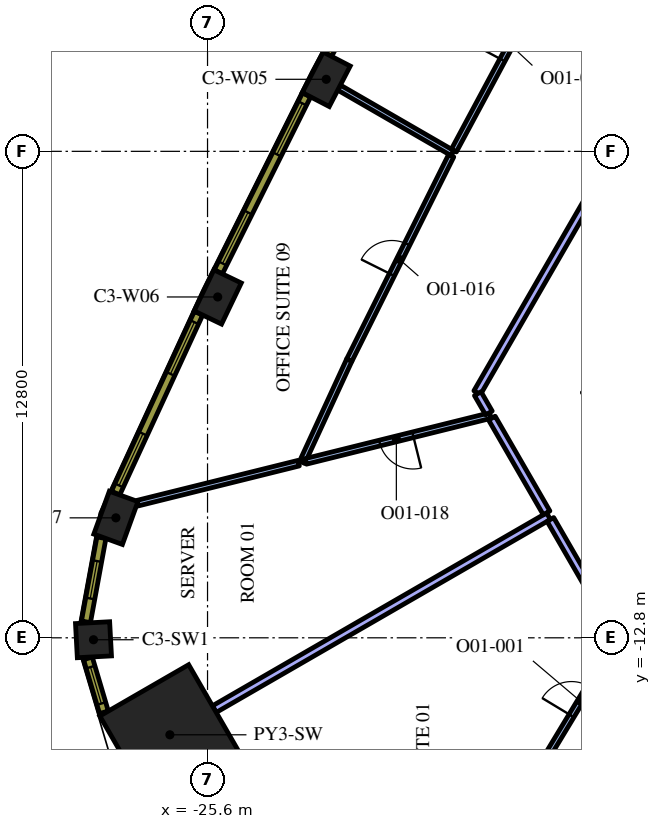
"""IFC4 building model, lengths in metres.
Left out: names, types, materials, properties, quantities, classifications, styles, units other than length and angle.
Written with IfcOpenShell. Run it as: python <this file> out.ifc"""

import sys

from ifc_helpers import new_model, si_unit, direction, frame, frame_2d, origin, origin_2d, place, context, subcontext, project, spatial, rectangle, extrude, element, fill, save


model = new_model("IFC4")
c1 = context("Model", 3, precision=1e-05, world=origin(), true_north=direction((0.0, 1.0)))
c2 = subcontext(c1, "Body", "Model", "MODEL_VIEW")
j1 = project(units=[si_unit("LENGTHUNIT", "METRE"), si_unit("PLANEANGLEUNIT", "RADIAN")], contexts=[c1])
p1 = place(None, origin())
s1 = spatial("IfcSite", under=j1, at=p1, CompositionType="ELEMENT")
p2 = place(p1, origin())
s2 = spatial("IfcBuilding", under=s1, at=p2, CompositionType="ELEMENT")
p3 = place(p2, frame((0.0, 0.0, 150.0)))
s3 = spatial("IfcBuildingStorey", under=s2, at=p3, CompositionType="ELEMENT", Elevation=150.0)
p4 = place(p3, frame((-26.591, -15.352, 0.0), z_axis=(0.0, 0.0, 1.0), x_axis=(-0.866025403784, -0.5, 0.0)))
e1 = element("IfcColumn", 1, at=p4, inside=s3, PredefinedType="COLUMN", context=c2, shape_type="SweptSolid", body=[
    extrude(rectangle(XDim=2.7, YDim=2.7, at=origin_2d()), origin(), (0.0, 0.0, 1.0), 4.2),
])
for number, where, z_axis, x_axis in (
    (2, (-22.476, 1.896, 0.0), (0.0, 0.0, 1.0), (-0.46, -0.888, 0.0)),
    (3, (-25.332, -3.832, 0.0), (0.0, 0.0, 1.0), (-0.433, -0.902, 0.0)),
    (4, (-28.012, -9.644, 0.0), (0.0, 0.0, 1.0), (-0.341, -0.94, 0.0)),
):
    element("IfcColumn", number, at=place(p3, frame(where, z_axis=z_axis, x_axis=x_axis)), inside=s3, PredefinedType="COLUMN", context=c2, shape_type="SweptSolid", body=[
        extrude(rectangle(XDim=1.2, YDim=0.8, at=origin_2d()), origin(), (0.0, 0.0, 1.0), 4.2),
    ])
p5 = place(p3, frame((-28.601, -12.851, 0.0), z_axis=(0.0, 0.0, 1.0), x_axis=(0.0533921468, -0.998573622053, 0.0)))
e5 = element("IfcColumn", 5, at=p5, inside=s3, PredefinedType="COLUMN", context=c2, shape_type="SweptSolid", body=[
    extrude(rectangle(XDim=0.9, YDim=0.9, at=origin_2d()), origin(), (0.0, 0.0, 1.0), 4.2),
])
p6 = place(p3, frame((-16.775, -16.097, 0.0), z_axis=(0.0, 0.0, 1.0), x_axis=(0.516793803756, 0.856109902057, 0.0)))
e6 = element("IfcWall", 6, at=p6, inside=s3, PredefinedType="PARTITIONING", context=c2, shape_type="SweptSolid", body=[
    extrude(rectangle(XDim=3.856, YDim=0.15, at=frame_2d((1.928, 0.0))), origin(), (0.0, 0.0, 1.0), 3.15),
])
p7 = place(p6, frame((1.456, 0.0, 0.0)))
e7 = element("IfcOpeningElement", 7, at=p7, cuts=e6, PredefinedType="OPENING", context=c2, shape_type="SweptSolid", body=[
    extrude(rectangle(XDim=0.9, YDim=2.1, at=frame_2d((0.45, 1.05))), frame((0.0, 0.085, 0.0), z_axis=(0.0, -1.0, 0.0), x_axis=(1.0, 0.0, 0.0)), (0.0, 0.0, 1.0), 0.17),
])
p8 = place(p3, frame((-25.421, -14.677, 0.0), z_axis=(0.0, 0.0, 1.0), x_axis=(0.866031435434, 0.499989552732, 0.0)))
e8 = element("IfcWall", 8, at=p8, inside=s3, PredefinedType="PARTITIONING", context=c2, shape_type="SweptSolid", body=[
    extrude(rectangle(XDim=10.154, YDim=0.2, at=frame_2d((5.077, 0.0))), origin(), (0.0, 0.0, 1.0), 3.15),
])
p9 = place(p3, frame((-16.578, -9.687, 0.0), z_axis=(0.0, 0.0, 1.0), x_axis=(0.499981686864, -0.86603597662, 0.0)))
e9 = element("IfcWall", 9, at=p9, inside=s3, PredefinedType="PARTITIONING", context=c2, shape_type="SweptSolid", body=[
    extrude(rectangle(XDim=3.506, YDim=0.2, at=frame_2d((1.753, 0.0))), origin(), (0.0, 0.0, 1.0), 3.15),
])
p10 = place(p3, frame((-19.154, -0.046, 0.0), z_axis=(0.0, 0.0, 1.0), x_axis=(-0.866051136095, 0.499955427682, 0.0)))
e10 = element("IfcWall", 10, at=p10, inside=s3, PredefinedType="PARTITIONING", context=c2, shape_type="SweptSolid", body=[
    extrude(rectangle(XDim=3.447, YDim=0.15, at=frame_2d((1.724, 0.0))), origin(), (0.0, 0.0, 1.0), 3.15),
])
p11 = place(p3, frame((-19.118, 0.02, 0.0), z_axis=(0.0, 0.0, 1.0), x_axis=(0.47251230182, 0.88132407469, 0.0)))
e11 = element("IfcWall", 11, at=p11, inside=s3, PredefinedType="PARTITIONING", context=c2, shape_type="SweptSolid", body=[
    extrude(rectangle(XDim=6.404, YDim=0.15, at=frame_2d((3.202, 0.0))), origin(), (0.0, 0.0, 1.0), 3.15),
])
p12 = place(p11, frame((2.704, 0.0, 0.0)))
e12 = element("IfcOpeningElement", 12, at=p12, cuts=e11, PredefinedType="OPENING", context=c2, shape_type="SweptSolid", body=[
    extrude(rectangle(XDim=0.9, YDim=2.1, at=frame_2d((0.45, 1.05))), frame((0.0, 0.085, 0.0), z_axis=(0.0, -1.0, 0.0), x_axis=(1.0, 0.0, 0.0)), (0.0, 0.0, 1.0), 0.17),
])
p13 = place(p3, frame((-21.869, -5.493, 0.0), z_axis=(0.0, 0.0, 1.0), x_axis=(0.44618972677, 0.894938393257, 0.0)))
e13 = element("IfcWall", 13, at=p13, inside=s3, PredefinedType="PARTITIONING", context=c2, shape_type="SweptSolid", body=[
    extrude(rectangle(XDim=6.011, YDim=0.15, at=frame_2d((3.005, 0.0))), origin(), (0.0, 0.0, 1.0), 3.15),
])
p14 = place(p13, frame((2.511, 0.0, 0.0)))
e14 = element("IfcOpeningElement", 14, at=p14, cuts=e13, PredefinedType="OPENING", context=c2, shape_type="SweptSolid", body=[
    extrude(rectangle(XDim=0.9, YDim=2.1, at=frame_2d((0.45, 1.05))), frame((0.0, 0.085, 0.0), z_axis=(0.0, -1.0, 0.0), x_axis=(1.0, 0.0, 0.0)), (0.0, 0.0, 1.0), 0.17),
])
p15 = place(p3, frame((-21.869, -5.493, 0.0), z_axis=(0.0, 0.0, 1.0), x_axis=(-0.418791486232, -0.908082425256, 0.0)))
e15 = element("IfcWall", 15, at=p15, inside=s3, PredefinedType="PARTITIONING", context=c2, shape_type="SweptSolid", body=[
    extrude(rectangle(XDim=2.961, YDim=0.15, at=frame_2d((1.48, 0.0))), origin(), (0.0, 0.0, 1.0), 3.15),
])
p16 = place(p3, frame((-23.203, -8.205, 0.0), z_axis=(0.0, 0.0, 1.0), x_axis=(-0.970525493326, -0.240998478843, 0.0)))
e16 = element("IfcWall", 16, at=p16, inside=s3, PredefinedType="PARTITIONING", context=c2, shape_type="SweptSolid", body=[
    extrude(rectangle(XDim=4.373, YDim=0.15, at=frame_2d((2.187, 0.0))), origin(), (0.0, 0.0, 1.0), 3.15),
])
p17 = place(p3, frame((-18.156, -6.952, 0.0), z_axis=(0.0, 0.0, 1.0), x_axis=(-0.97052275783, -0.241009494697, 0.0)))
e17 = element("IfcWall", 17, at=p17, inside=s3, PredefinedType="PARTITIONING", context=c2, shape_type="SweptSolid", body=[
    extrude(rectangle(XDim=5.007, YDim=0.15, at=frame_2d((2.504, 0.0))), origin(), (0.0, 0.0, 1.0), 3.15),
])
p18 = place(p17, frame((2.1, 0.0, 0.0)))
e18 = element("IfcOpeningElement", 18, at=p18, cuts=e17, PredefinedType="OPENING", context=c2, shape_type="SweptSolid", body=[
    extrude(rectangle(XDim=0.9, YDim=2.1, at=frame_2d((0.45, 1.05))), frame((0.0, 0.085, 0.0), z_axis=(0.0, -1.0, 0.0), x_axis=(1.0, 0.0, 0.0)), (0.0, 0.0, 1.0), 0.17),
])
p19 = place(p3, frame((-13.643, 2.069, 0.0), z_axis=(0.0, 0.0, 1.0), x_axis=(-0.500012305324, -0.866018299186, 0.0)))
e19 = element("IfcWall", 19, at=p19, inside=s3, PredefinedType="PARTITIONING", context=c2, shape_type="SweptSolid", body=[
    extrude(rectangle(XDim=9.721, YDim=0.2, at=frame_2d((4.861, 0.0))), origin(), (0.0, 0.0, 1.0), 3.15),
])
p20 = place(p3, frame((-18.489, -6.376, 0.0), z_axis=(0.0, 0.0, 1.0), x_axis=(0.499986503906, -0.866033195618, 0.0)))
e20 = element("IfcWall", 20, at=p20, inside=s3, PredefinedType="PARTITIONING", context=c2, shape_type="SweptSolid", body=[
    extrude(rectangle(XDim=0.587, YDim=0.2, at=frame_2d((0.293, 0.0))), origin(), (0.0, 0.0, 1.0), 3.15),
])
p21 = place(p3, frame((-18.118, -7.02, 0.0), z_axis=(0.0, 0.0, 1.0), x_axis=(0.500023335103, -0.866011930837, 0.0)))
e21 = element("IfcWall", 21, at=p21, inside=s3, PredefinedType="PARTITIONING", context=c2, shape_type="SweptSolid", body=[
    extrude(rectangle(XDim=2.88, YDim=0.2, at=frame_2d((1.44, 0.0))), origin(), (0.0, 0.0, 1.0), 3.15),
])
p22 = place(p3, frame((-19.977, 7.139, 0.0), z_axis=(0.0, 0.0, 1.0), x_axis=(-0.473349833294, -0.880874528704, 0.0)))
e22 = element("IfcWall", 22, at=p22, inside=s3, PredefinedType="SOLIDWALL", context=c2, shape_type="SweptSolid", body=[
    extrude(rectangle(XDim=5.204, YDim=0.24, at=frame_2d((2.602, 0.0))), origin(), (0.0, 0.0, 1.0), 3.95),
])
p23 = place(p22, frame((0.248, 0.0, 0.9)))
e23 = element("IfcOpeningElement", 23, at=p23, cuts=e22, PredefinedType="OPENING", context=c2, shape_type="SweptSolid", body=[
    extrude(rectangle(XDim=1.5, YDim=2.55, at=frame_2d((0.75, 1.275))), frame((0.0, 0.13, 0.0), z_axis=(0.0, -1.0, 0.0), x_axis=(1.0, 0.0, 0.0)), (0.0, 0.0, 1.0), 0.26),
])
p24 = place(p22, frame((3.455, 0.0, 0.9)))
e24 = element("IfcOpeningElement", 24, at=p24, cuts=e22, PredefinedType="OPENING", context=c2, shape_type="SweptSolid", body=[
    extrude(rectangle(XDim=1.5, YDim=2.55, at=frame_2d((0.75, 1.275))), frame((0.0, 0.13, 0.0), z_axis=(0.0, -1.0, 0.0), x_axis=(1.0, 0.0, 0.0)), (0.0, 0.0, 1.0), 0.26),
])
p25 = place(p3, frame((-22.994, 1.485, 0.0), z_axis=(0.0, 0.0, 1.0), x_axis=(-0.446256171312, -0.8949052629, 0.0)))
e25 = element("IfcWall", 25, at=p25, inside=s3, PredefinedType="SOLIDWALL", context=c2, shape_type="SweptSolid", body=[
    extrude(rectangle(XDim=5.203, YDim=0.24, at=frame_2d((2.602, 0.0))), origin(), (0.0, 0.0, 1.0), 3.95),
])
p26 = place(p25, frame((0.248, 0.0, 0.9)))
e26 = element("IfcOpeningElement", 26, at=p26, cuts=e25, PredefinedType="OPENING", context=c2, shape_type="SweptSolid", body=[
    extrude(rectangle(XDim=1.5, YDim=2.55, at=frame_2d((0.75, 1.275))), frame((0.0, 0.13, 0.0), z_axis=(0.0, -1.0, 0.0), x_axis=(1.0, 0.0, 0.0)), (0.0, 0.0, 1.0), 0.26),
])
p27 = place(p25, frame((3.455, 0.0, 0.9)))
e27 = element("IfcOpeningElement", 27, at=p27, cuts=e25, PredefinedType="OPENING", context=c2, shape_type="SweptSolid", body=[
    extrude(rectangle(XDim=1.5, YDim=2.55, at=frame_2d((0.75, 1.275))), frame((0.0, 0.13, 0.0), z_axis=(0.0, -1.0, 0.0), x_axis=(1.0, 0.0, 0.0)), (0.0, 0.0, 1.0), 0.26),
])
p28 = place(p3, frame((-25.837, -4.258, 0.0), z_axis=(0.0, 0.0, 1.0), x_axis=(-0.418722559465, -0.908114209885, 0.0)))
e28 = element("IfcWall", 28, at=p28, inside=s3, PredefinedType="SOLIDWALL", context=c2, shape_type="SweptSolid", body=[
    extrude(rectangle(XDim=5.213, YDim=0.24, at=frame_2d((2.606, 0.0))), origin(), (0.0, 0.0, 1.0), 3.95),
])
p29 = place(p28, frame((0.261, 0.0, 0.9)))
e29 = element("IfcOpeningElement", 29, at=p29, cuts=e28, PredefinedType="OPENING", context=c2, shape_type="SweptSolid", body=[
    extrude(rectangle(XDim=1.5, YDim=2.55, at=frame_2d((0.75, 1.275))), frame((0.0, 0.13, 0.0), z_axis=(0.0, -1.0, 0.0), x_axis=(1.0, 0.0, 0.0)), (0.0, 0.0, 1.0), 0.26),
])
p30 = place(p28, frame((3.492, 0.0, 0.9)))
e30 = element("IfcOpeningElement", 30, at=p30, cuts=e28, PredefinedType="OPENING", context=c2, shape_type="SweptSolid", body=[
    extrude(rectangle(XDim=1.5, YDim=2.55, at=frame_2d((0.75, 1.275))), frame((0.0, 0.13, 0.0), z_axis=(0.0, -1.0, 0.0), x_axis=(1.0, 0.0, 0.0)), (0.0, 0.0, 1.0), 0.26),
])
p31 = place(p3, frame((-28.393, -10.167, 0.0), z_axis=(0.0, 0.0, 1.0), x_axis=(-0.180737189259, -0.983531427265, 0.0)))
e31 = element("IfcWall", 31, at=p31, inside=s3, PredefinedType="SOLIDWALL", context=c2, shape_type="SweptSolid", body=[
    extrude(rectangle(XDim=2.25, YDim=0.24, at=frame_2d((1.125, 0.0))), origin(), (0.0, 0.0, 1.0), 3.95),
])
p32 = place(p31, frame((0.625, 0.0, 0.9)))
e32 = element("IfcOpeningElement", 32, at=p32, cuts=e31, PredefinedType="OPENING", context=c2, shape_type="SweptSolid", body=[
    extrude(rectangle(XDim=1.0, YDim=2.55, at=frame_2d((0.5, 1.275))), frame((0.0, 0.13, 0.0), z_axis=(0.0, -1.0, 0.0), x_axis=(1.0, 0.0, 0.0)), (0.0, 0.0, 1.0), 0.26),
])
p33 = place(p3, frame((-28.748, -13.34, 0.0), z_axis=(0.0, 0.0, 1.0), x_axis=(0.284413721403, -0.958701640281, 0.0)))
e33 = element("IfcWall", 33, at=p33, inside=s3, PredefinedType="SOLIDWALL", context=c2, shape_type="SweptSolid", body=[
    extrude(rectangle(XDim=1.482, YDim=0.24, at=frame_2d((0.741, 0.0))), origin(), (0.0, 0.0, 1.0), 3.95),
])
p34 = place(p33, frame((0.241, 0.0, 0.9)))
e34 = element("IfcOpeningElement", 34, at=p34, cuts=e33, PredefinedType="OPENING", context=c2, shape_type="SweptSolid", body=[
    extrude(rectangle(XDim=1.0, YDim=2.55, at=frame_2d((0.5, 1.275))), frame((0.0, 0.13, 0.0), z_axis=(0.0, -1.0, 0.0), x_axis=(1.0, 0.0, 0.0)), (0.0, 0.0, 1.0), 0.26),
])
p35 = place(p7, origin())
e35 = element("IfcDoor", 35, at=p35, inside=s3, OperationType="SINGLE_SWING_LEFT", PredefinedType="DOOR", context=c2, shape_type="SweptSolid", body=[
    extrude(rectangle(XDim=0.9, YDim=2.1, at=frame_2d((0.45, 1.05))), frame((0.0, 0.025, 0.0), z_axis=(0.0, -1.0, 0.0), x_axis=(1.0, 0.0, 0.0)), (0.0, 0.0, 1.0), 0.05),
])
fill(e7, e35)
p36 = place(p12, origin())
e36 = element("IfcDoor", 36, at=p36, inside=s3, OperationType="SINGLE_SWING_LEFT", PredefinedType="DOOR", context=c2, shape_type="SweptSolid", body=[
    extrude(rectangle(XDim=0.9, YDim=2.1, at=frame_2d((0.45, 1.05))), frame((0.0, 0.025, 0.0), z_axis=(0.0, -1.0, 0.0), x_axis=(1.0, 0.0, 0.0)), (0.0, 0.0, 1.0), 0.05),
])
fill(e12, e36)
p37 = place(p14, origin())
e37 = element("IfcDoor", 37, at=p37, inside=s3, OperationType="SINGLE_SWING_LEFT", PredefinedType="DOOR", context=c2, shape_type="SweptSolid", body=[
    extrude(rectangle(XDim=0.9, YDim=2.1, at=frame_2d((0.45, 1.05))), frame((0.0, 0.025, 0.0), z_axis=(0.0, -1.0, 0.0), x_axis=(1.0, 0.0, 0.0)), (0.0, 0.0, 1.0), 0.05),
])
fill(e14, e37)
p38 = place(p18, origin())
e38 = element("IfcDoor", 38, at=p38, inside=s3, OperationType="SINGLE_SWING_RIGHT", PredefinedType="DOOR", context=c2, shape_type="SweptSolid", body=[
    extrude(rectangle(XDim=0.9, YDim=2.1, at=frame_2d((0.45, 1.05))), frame((0.0, 0.025, 0.0), z_axis=(0.0, -1.0, 0.0), x_axis=(1.0, 0.0, 0.0)), (0.0, 0.0, 1.0), 0.05),
])
fill(e18, e38)
p39 = place(p26, origin())
e39 = element("IfcWindow", 39, at=p39, inside=s3, PartitioningType="SINGLE_PANEL", PredefinedType="WINDOW", context=c2, shape_type="SweptSolid", body=[
    extrude(rectangle(XDim=1.5, YDim=2.55, at=frame_2d((0.75, 1.275))), frame((0.0, 0.04, 0.0), z_axis=(0.0, -1.0, 0.0), x_axis=(1.0, 0.0, 0.0)), (0.0, 0.0, 1.0), 0.06),
])
fill(e26, e39)
p40 = place(p27, origin())
e40 = element("IfcWindow", 40, at=p40, inside=s3, PartitioningType="SINGLE_PANEL", PredefinedType="WINDOW", context=c2, shape_type="SweptSolid", body=[
    extrude(rectangle(XDim=1.5, YDim=2.55, at=frame_2d((0.75, 1.275))), frame((0.0, 0.04, 0.0), z_axis=(0.0, -1.0, 0.0), x_axis=(1.0, 0.0, 0.0)), (0.0, 0.0, 1.0), 0.06),
])
fill(e27, e40)
p41 = place(p29, origin())
e41 = element("IfcWindow", 41, at=p41, inside=s3, PartitioningType="SINGLE_PANEL", PredefinedType="WINDOW", context=c2, shape_type="SweptSolid", body=[
    extrude(rectangle(XDim=1.5, YDim=2.55, at=frame_2d((0.75, 1.275))), frame((0.0, 0.04, 0.0), z_axis=(0.0, -1.0, 0.0), x_axis=(1.0, 0.0, 0.0)), (0.0, 0.0, 1.0), 0.06),
])
fill(e29, e41)
p42 = place(p30, origin())
e42 = element("IfcWindow", 42, at=p42, inside=s3, PartitioningType="SINGLE_PANEL", PredefinedType="WINDOW", context=c2, shape_type="SweptSolid", body=[
    extrude(rectangle(XDim=1.5, YDim=2.55, at=frame_2d((0.75, 1.275))), frame((0.0, 0.04, 0.0), z_axis=(0.0, -1.0, 0.0), x_axis=(1.0, 0.0, 0.0)), (0.0, 0.0, 1.0), 0.06),
])
fill(e30, e42)
p43 = place(p32, origin())
e43 = element("IfcWindow", 43, at=p43, inside=s3, PartitioningType="SINGLE_PANEL", PredefinedType="WINDOW", context=c2, shape_type="SweptSolid", body=[
    extrude(rectangle(XDim=1.0, YDim=2.55, at=frame_2d((0.5, 1.275))), frame((0.0, 0.04, 0.0), z_axis=(0.0, -1.0, 0.0), x_axis=(1.0, 0.0, 0.0)), (0.0, 0.0, 1.0), 0.06),
])
fill(e32, e43)
p44 = place(p34, origin())
e44 = element("IfcWindow", 44, at=p44, inside=s3, PartitioningType="SINGLE_PANEL", PredefinedType="WINDOW", context=c2, shape_type="SweptSolid", body=[
    extrude(rectangle(XDim=1.0, YDim=2.55, at=frame_2d((0.5, 1.275))), frame((0.0, 0.04, 0.0), z_axis=(0.0, -1.0, 0.0), x_axis=(1.0, 0.0, 0.0)), (0.0, 0.0, 1.0), 0.06),
])
fill(e34, e44)
save(model, sys.argv[1])
